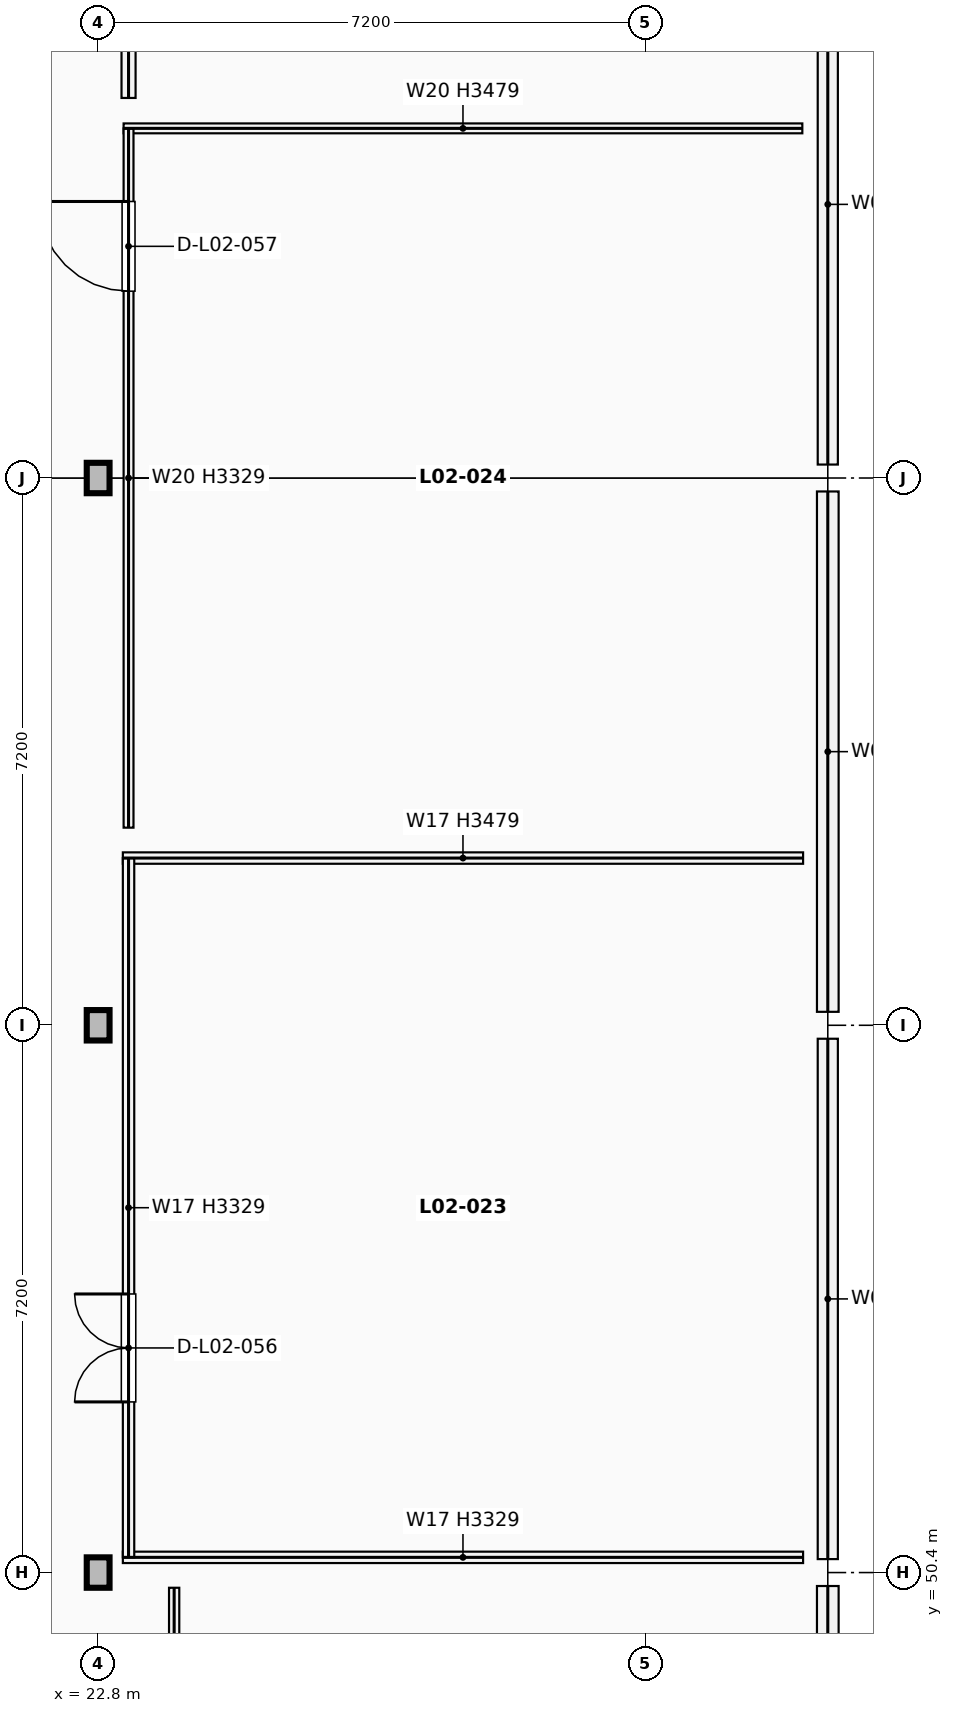
"""IFC4 building model, lengths in metres.
Left out: names, types, materials, properties, quantities, classifications, styles, units other than length and angle.
Written with IfcOpenShell. Run it as: python <this file> out.ifc"""

import sys

from ifc_helpers import new_model, si_unit, direction, frame, frame_2d, origin, origin_2d, place, context, subcontext, project, spatial, rectangle, i_section, extrude, element, fill, save


model = new_model("IFC4")
c1 = context("Model", 3, precision=1e-05, world=origin(), true_north=direction((0.0, 1.0)))
c2 = subcontext(c1, "Body", "Model", "MODEL_VIEW")
j1 = project(units=[si_unit("LENGTHUNIT", "METRE"), si_unit("PLANEANGLEUNIT", "RADIAN")], contexts=[c1])
p1 = place(None, origin())
s1 = spatial("IfcSite", under=j1, at=p1, CompositionType="ELEMENT")
p2 = place(p1, origin())
s2 = spatial("IfcBuilding", under=s1, at=p2, CompositionType="ELEMENT")
p3 = place(p2, frame((0.0, 0.0, 9.52)))
s3 = spatial("IfcBuildingStorey", under=s2, at=p3, CompositionType="ELEMENT", Elevation=9.52)
for number, where, z_axis, x_axis in (
    (1, (22.8, 50.4, 0.0), (0.0, 0.0, 1.0), (1.0, 0.0, 0.0)),
    (2, (22.8, 57.6, 0.0), (0.0, 0.0, 1.0), (1.0, 0.0, 0.0)),
    (3, (22.8, 64.8, 0.0), (0.0, 0.0, 1.0), (1.0, 0.0, 0.0)),
):
    element("IfcColumn", number, at=place(p3, frame(where, z_axis=z_axis, x_axis=x_axis)), inside=s3, PredefinedType="COLUMN", context=c2, shape_type="SweptSolid", body=[
        extrude(i_section(OverallWidth=0.3, OverallDepth=0.4, WebThickness=0.013, FlangeThickness=0.024, at=origin_2d()), origin(), (0.0, 0.0, 1.0), 4.08),
    ])
p4 = place(p3, frame((32.4, 44.4, 0.0), z_axis=(0.0, 0.0, 1.0), x_axis=(0.0, 1.0, 0.0)))
e4 = element("IfcWall", 4, at=p4, inside=s3, PredefinedType="SOLIDWALL", context=c2, shape_type="SweptSolid", body=[
    extrude(rectangle(XDim=5.823, YDim=0.285, at=frame_2d((2.912, 0.0))), origin(), (0.0, 0.0, 1.0), 3.329),
])
p5 = place(p3, frame((32.4, 50.577, 0.0), z_axis=(0.0, 0.0, 1.0), x_axis=(0.0, 1.0, 0.0)))
e5 = element("IfcWall", 5, at=p5, inside=s3, PredefinedType="SOLIDWALL", context=c2, shape_type="SweptSolid", body=[
    extrude(rectangle(XDim=6.846, YDim=0.265, at=frame_2d((3.423, 0.0))), origin(), (0.0, 0.0, 1.0), 3.329),
])
p6 = place(p3, frame((32.4, 57.777, 0.0), z_axis=(0.0, 0.0, 1.0), x_axis=(0.0, 1.0, 0.0)))
e6 = element("IfcWall", 6, at=p6, inside=s3, PredefinedType="SOLIDWALL", context=c2, shape_type="SweptSolid", body=[
    extrude(rectangle(XDim=6.846, YDim=0.285, at=frame_2d((3.423, 0.0))), origin(), (0.0, 0.0, 1.0), 3.329),
])
p7 = place(p3, frame((32.4, 64.977, 0.0), z_axis=(0.0, 0.0, 1.0), x_axis=(0.0, 1.0, 0.0)))
e7 = element("IfcWall", 7, at=p7, inside=s3, PredefinedType="SOLIDWALL", context=c2, shape_type="SweptSolid", body=[
    extrude(rectangle(XDim=6.846, YDim=0.265, at=frame_2d((3.423, 0.0))), origin(), (0.0, 0.0, 1.0), 3.329),
])
p8 = place(p3, frame((23.125, 50.6, 0.0), z_axis=(0.0, 0.0, 1.0), x_axis=(1.0, 0.0, 0.0)))
e8 = element("IfcWall", 8, at=p8, inside=s3, PredefinedType="PARTITIONING", context=c2, shape_type="SweptSolid", body=[
    extrude(rectangle(XDim=8.95, YDim=0.15, at=frame_2d((4.475, 0.0))), origin(), (0.0, 0.0, 1.0), 3.329),
])
p9 = place(p3, frame((23.125, 59.8, 0.0), z_axis=(0.0, 0.0, 1.0), x_axis=(1.0, 0.0, 0.0)))
e9 = element("IfcWall", 9, at=p9, inside=s3, PredefinedType="PARTITIONING", context=c2, shape_type="SweptSolid", body=[
    extrude(rectangle(XDim=8.95, YDim=0.15, at=frame_2d((4.475, 0.0))), origin(), (0.0, 0.0, 1.0), 3.479),
])
p10 = place(p3, frame((23.2, 50.6, 0.0), z_axis=(0.0, 0.0, 1.0), x_axis=(0.0, 1.0, 0.0)))
e10 = element("IfcWall", 10, at=p10, inside=s3, PredefinedType="PARTITIONING", context=c2, shape_type="SweptSolid", body=[
    extrude(rectangle(XDim=9.2, YDim=0.15, at=frame_2d((4.6, 0.0))), origin(), (0.0, 0.0, 1.0), 3.329),
])
p11 = place(p10, frame((2.045, 0.0, 0.0)))
e11 = element("IfcOpeningElement", 11, at=p11, cuts=e10, PredefinedType="OPENING", context=c2, shape_type="SweptSolid", body=[
    extrude(rectangle(XDim=1.42, YDim=2.26, at=frame_2d((0.71, 1.13))), frame((0.0, 0.085, 0.0), z_axis=(0.0, -1.0, 0.0), x_axis=(1.0, 0.0, 0.0)), (0.0, 0.0, 1.0), 0.17),
])
p12 = place(p3, frame((23.135, 69.4, 0.0), z_axis=(0.0, 0.0, 1.0), x_axis=(1.0, 0.0, 0.0)))
e12 = element("IfcWall", 12, at=p12, inside=s3, PredefinedType="PARTITIONING", context=c2, shape_type="SweptSolid", body=[
    extrude(rectangle(XDim=8.93, YDim=0.13, at=frame_2d((4.465, 0.0))), origin(), (0.0, 0.0, 1.0), 3.479),
])
p13 = place(p3, frame((23.2, 60.2, 0.0), z_axis=(0.0, 0.0, 1.0), x_axis=(0.0, 1.0, 0.0)))
e13 = element("IfcWall", 13, at=p13, inside=s3, PredefinedType="PARTITIONING", context=c2, shape_type="SweptSolid", body=[
    extrude(rectangle(XDim=9.2, YDim=0.13, at=frame_2d((4.6, 0.0))), origin(), (0.0, 0.0, 1.0), 3.329),
])
p14 = place(p13, frame((7.058, 0.0, 0.0)))
e14 = element("IfcOpeningElement", 14, at=p14, cuts=e13, PredefinedType="OPENING", context=c2, shape_type="SweptSolid", body=[
    extrude(rectangle(XDim=1.18, YDim=2.14, at=frame_2d((0.59, 1.07))), frame((0.0, 0.075, 0.0), z_axis=(0.0, -1.0, 0.0), x_axis=(1.0, 0.0, 0.0)), (0.0, 0.0, 1.0), 0.15),
])
p15 = place(p3, frame((23.2, 69.8, 0.0), z_axis=(0.0, 0.0, 1.0), x_axis=(0.0, 1.0, 0.0)))
e15 = element("IfcWall", 15, at=p15, inside=s3, PredefinedType="PARTITIONING", context=c2, shape_type="SweptSolid", body=[
    extrude(rectangle(XDim=9.6, YDim=0.185, at=frame_2d((4.8, 0.0))), origin(), (0.0, 0.0, 1.0), 3.329),
])
p16 = place(p15, frame((4.275, 0.0, 0.0)))
e16 = element("IfcOpeningElement", 16, at=p16, cuts=e15, PredefinedType="OPENING", context=c2, shape_type="SweptSolid", body=[
    extrude(rectangle(XDim=1.05, YDim=2.15, at=frame_2d((0.525, 1.075))), frame((0.0, 0.103, 0.0), z_axis=(0.0, -1.0, 0.0), x_axis=(1.0, 0.0, 0.0)), (0.0, 0.0, 1.0), 0.205),
])
p17 = place(p3, frame((23.8, 47.6, 0.0), z_axis=(0.0, 0.0, 1.0), x_axis=(0.0, 1.0, 0.0)))
e17 = element("IfcWall", 17, at=p17, inside=s3, PredefinedType="PARTITIONING", context=c2, shape_type="SweptSolid", body=[
    extrude(rectangle(XDim=2.6, YDim=0.135, at=frame_2d((1.3, 0.0))), origin(), (0.0, 0.0, 1.0), 3.329),
])
p18 = place(p11, origin())
e18 = element("IfcDoor", 18, at=p18, inside=s3, OperationType="DOUBLE_DOOR_SINGLE_SWING", PredefinedType="DOOR", context=c2, shape_type="SweptSolid", body=[
    extrude(rectangle(XDim=1.42, YDim=2.26, at=frame_2d((0.71, 1.13))), frame((0.0, 0.025, 0.0), z_axis=(0.0, -1.0, 0.0), x_axis=(1.0, 0.0, 0.0)), (0.0, 0.0, 1.0), 0.05),
])
fill(e11, e18)
p19 = place(p14, origin())
e19 = element("IfcDoor", 19, at=p19, inside=s3, OperationType="SINGLE_SWING_RIGHT", PredefinedType="DOOR", context=c2, shape_type="SweptSolid", body=[
    extrude(rectangle(XDim=1.18, YDim=2.14, at=frame_2d((0.59, 1.07))), frame((0.0, 0.025, 0.0), z_axis=(0.0, -1.0, 0.0), x_axis=(1.0, 0.0, 0.0)), (0.0, 0.0, 1.0), 0.05),
])
fill(e14, e19)
save(model, sys.argv[1])
